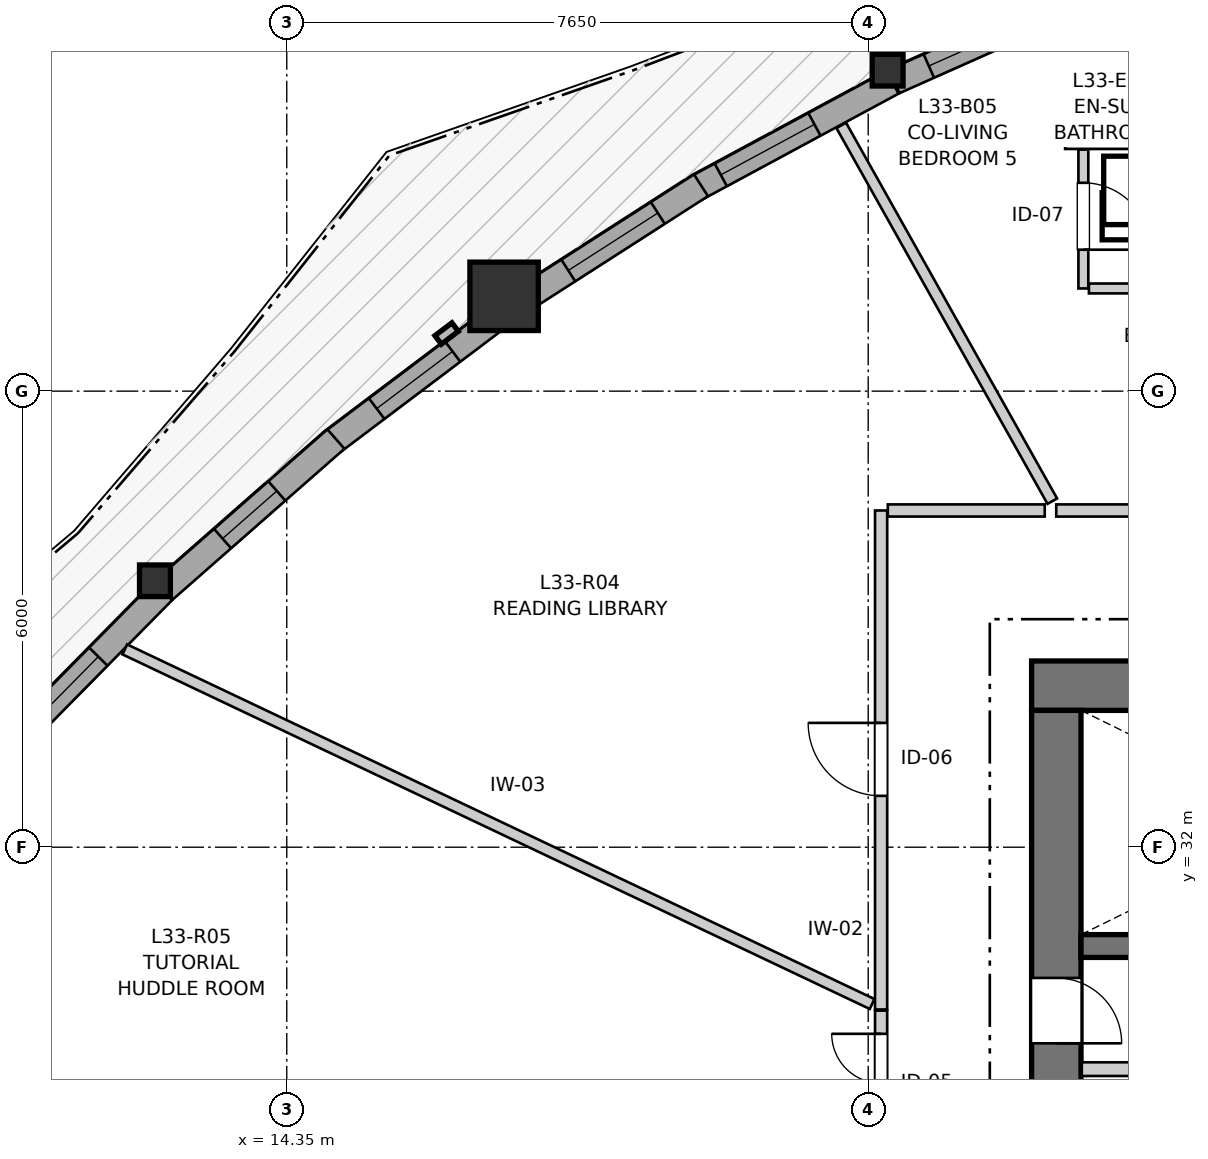
"""IFC4 building model, lengths in metres.
Left out: names, types, materials, properties, quantities, classifications, styles, units other than length and angle.
Written with IfcOpenShell. Run it as: python <this file> out.ifc"""

import sys

from ifc_helpers import new_model, si_unit, direction, frame, frame_2d, origin, origin_2d, place, context, subcontext, project, spatial, rectangle, i_section, extrude, source, transform, mapped, element, fill, save


model = new_model("IFC4")
c1 = context("Model", 3, precision=1e-05, world=origin(), true_north=direction((0.0, 1.0)))
c2 = subcontext(c1, "Body", "Model", "MODEL_VIEW")
j1 = project(units=[si_unit("LENGTHUNIT", "METRE"), si_unit("PLANEANGLEUNIT", "RADIAN")], contexts=[c1])
p1 = place(None, origin())
s1 = spatial("IfcSite", under=j1, at=p1, CompositionType="ELEMENT")
p2 = place(p1, origin())
s2 = spatial("IfcBuilding", under=s1, at=p2, CompositionType="ELEMENT")
p3 = place(p2, frame((0.0, 0.0, 112.0)))
s3 = spatial("IfcBuildingStorey", under=s2, at=p3, CompositionType="ELEMENT", Elevation=112.0)
p4 = place(p3, frame((36.55, 34.125, 0.0), z_axis=(0.0, 0.0, 1.0), x_axis=(-1.0, 0.0, 0.0)))
e1 = element("IfcWall", 1, at=p4, inside=s3, PredefinedType="SHEAR", context=c2, shape_type="SweptSolid", body=[
    extrude(rectangle(XDim=12.4, YDim=0.65, at=frame_2d((6.2, 0.0))), origin(), (0.0, 0.0, 1.0), 2.935),
])
p5 = place(p3, frame((24.475, 33.8, 0.0), z_axis=(0.0, 0.0, 1.0), x_axis=(0.0, -1.0, 0.0)))
e2 = element("IfcWall", 2, at=p5, inside=s3, PredefinedType="SHEAR", context=c2, shape_type="SweptSolid", body=[
    extrude(rectangle(XDim=15.6, YDim=0.65, at=frame_2d((7.8, 0.0))), origin(), (0.0, 0.0, 1.0), 2.935),
])
p6 = place(p5, frame((7.05, 0.0, 0.0)))
e3 = element("IfcOpeningElement", 3, at=p6, cuts=e2, PredefinedType="OPENING", context=c2, shape_type="SweptSolid", body=[
    extrude(rectangle(XDim=1.5, YDim=2.15, at=frame_2d((0.75, 1.075))), frame((0.0, 0.335, 0.0), z_axis=(0.0, -1.0, 0.0), x_axis=(1.0, 0.0, 0.0)), (0.0, 0.0, 1.0), 0.67),
])
p7 = place(p5, frame((3.52, 0.0, 0.0)))
e4 = element("IfcOpeningElement", 4, at=p7, cuts=e2, PredefinedType="OPENING", context=c2, shape_type="SweptSolid", body=[
    extrude(rectangle(XDim=0.86, YDim=2.05, at=frame_2d((0.43, 1.025))), frame((0.0, 0.335, 0.0), z_axis=(0.0, -1.0, 0.0), x_axis=(1.0, 0.0, 0.0)), (0.0, 0.0, 1.0), 0.67),
])
p8 = place(p5, frame((11.22, 0.0, 0.0)))
e5 = element("IfcOpeningElement", 5, at=p8, cuts=e2, PredefinedType="OPENING", context=c2, shape_type="SweptSolid", body=[
    extrude(rectangle(XDim=0.86, YDim=2.05, at=frame_2d((0.43, 1.025))), frame((0.0, 0.335, 0.0), z_axis=(0.0, -1.0, 0.0), x_axis=(1.0, 0.0, 0.0)), (0.0, 0.0, 1.0), 0.67),
])
p9 = place(p3, frame((24.8, 30.7, 0.0), z_axis=(0.0, 0.0, 1.0), x_axis=(1.0, 0.0, 0.0)))
e6 = element("IfcWall", 6, at=p9, inside=s3, PredefinedType="SHEAR", context=c2, shape_type="SweptSolid", body=[
    extrude(rectangle(XDim=11.1, YDim=0.3, at=frame_2d((5.55, 0.0))), origin(), (0.0, 0.0, 1.0), 2.935),
])
p10 = place(p9, frame((6.22, 0.0, 0.0)))
e7 = element("IfcOpeningElement", 7, at=p10, cuts=e6, PredefinedType="OPENING", context=c2, shape_type="SweptSolid", body=[
    extrude(rectangle(XDim=0.98, YDim=2.15, at=frame_2d((0.49, 1.075))), frame((0.0, 0.16, 0.0), z_axis=(0.0, -1.0, 0.0), x_axis=(1.0, 0.0, 0.0)), (0.0, 0.0, 1.0), 0.32),
])
p11 = place(p9, frame((9.15, 0.0, 0.0)))
e8 = element("IfcOpeningElement", 8, at=p11, cuts=e6, PredefinedType="OPENING", context=c2, shape_type="SweptSolid", body=[
    extrude(rectangle(XDim=1.15, YDim=2.15, at=frame_2d((0.575, 1.075))), frame((0.0, 0.16, 0.0), z_axis=(0.0, -1.0, 0.0), x_axis=(1.0, 0.0, 0.0)), (0.0, 0.0, 1.0), 0.32),
])
m1 = source(origin(), c2, "Body", "SweptSolid", [
    extrude(i_section(OverallWidth=0.406, OverallDepth=0.416, WebThickness=0.027, FlangeThickness=0.044, FilletRadius=0.015, at=origin_2d()), origin(), (0.0, 0.0, 1.0), 2.935),
])
p12 = place(p3, frame((22.256, 42.222, 0.0), z_axis=(0.0, 0.0, 1.0), x_axis=(1.0, 0.0, 0.0)))
e9 = element("IfcColumn", 9, at=p12, inside=s3, PredefinedType="PILASTER", context=c2, shape_type="MappedRepresentation", body=[
    mapped(m1, transform((0.0, 0.0, 0.0), x_axis=(1.0, 0.0, 0.0), y_axis=(0.0, 1.0, 0.0), z_axis=(0.0, 0.0, 1.0), scale=1.0)),
])
m2 = source(origin(), c2, "Body", "SweptSolid", [
    extrude(rectangle(XDim=0.9, YDim=0.9, at=origin_2d()), origin(), (0.0, 0.0, 1.0), 2.935),
])
p13 = place(p3, frame((17.209, 39.247, 0.0), z_axis=(0.0, 0.0, 1.0), x_axis=(1.0, 0.0, 0.0)))
e10 = element("IfcColumn", 10, at=p13, inside=s3, PredefinedType="COLUMN", context=c2, shape_type="MappedRepresentation", body=[
    mapped(m2, transform((0.0, 0.0, 0.0), x_axis=(1.0, 0.0, 0.0), y_axis=(0.0, 1.0, 0.0), z_axis=(0.0, 0.0, 1.0), scale=1.0)),
])
p14 = place(p3, frame((12.616, 35.505, 0.0), z_axis=(0.0, 0.0, 1.0), x_axis=(1.0, 0.0, 0.0)))
e11 = element("IfcColumn", 11, at=p14, inside=s3, PredefinedType="PILASTER", context=c2, shape_type="MappedRepresentation", body=[
    mapped(m1, transform((0.0, 0.0, 0.0), x_axis=(1.0, 0.0, 0.0), y_axis=(0.0, 1.0, 0.0), z_axis=(0.0, 0.0, 1.0), scale=1.0)),
])
p15 = place(p3, frame((25.052, 43.283, 0.0), z_axis=(0.0, 0.0, 1.0), x_axis=(-0.913400340023, -0.407062426227, 0.0)))
e12 = element("IfcWall", 12, at=p15, inside=s3, PredefinedType="SOLIDWALL", context=c2, shape_type="SweptSolid", body=[
    extrude(rectangle(XDim=2.966, YDim=0.34, at=frame_2d((1.483, 0.0))), origin(), (0.0, 0.0, 1.0), 2.465),
])
p16 = place(p15, frame((0.518, 0.0, 0.82)))
e13 = element("IfcOpeningElement", 13, at=p16, cuts=e12, PredefinedType="OPENING", context=c2, shape_type="SweptSolid", body=[
    extrude(rectangle(XDim=1.95, YDim=1.4, at=frame_2d((0.975, 0.7))), frame((0.0, 0.18, 0.0), z_axis=(0.0, -1.0, 0.0), x_axis=(1.0, 0.0, 0.0)), (0.0, 0.0, 1.0), 0.36),
])
p17 = place(p3, frame((22.319, 42.063, 0.0), z_axis=(0.0, 0.0, 1.0), x_axis=(-0.880050731383, -0.4748796797, 0.0)))
e14 = element("IfcWall", 14, at=p17, inside=s3, PredefinedType="SOLIDWALL", context=c2, shape_type="SweptSolid", body=[
    extrude(rectangle(XDim=2.949, YDim=0.34, at=frame_2d((1.475, 0.0))), origin(), (0.0, 0.0, 1.0), 2.465),
])
p18 = place(p17, frame((1.166, 0.0, 0.82)))
e15 = element("IfcOpeningElement", 15, at=p18, cuts=e14, PredefinedType="OPENING", context=c2, shape_type="SweptSolid", body=[
    extrude(rectangle(XDim=1.4, YDim=1.35, at=frame_2d((0.7, 0.675))), frame((0.0, 0.18, 0.0), z_axis=(0.0, -1.0, 0.0), x_axis=(1.0, 0.0, 0.0)), (0.0, 0.0, 1.0), 0.36),
])
p19 = place(p3, frame((19.8, 40.708, 0.0), z_axis=(0.0, 0.0, 1.0), x_axis=(-0.841470838401, -0.540302533883, 0.0)))
e16 = element("IfcWall", 16, at=p19, inside=s3, PredefinedType="SOLIDWALL", context=c2, shape_type="SweptSolid", body=[
    extrude(rectangle(XDim=2.739, YDim=0.34, at=frame_2d((1.37, 0.0))), origin(), (0.0, 0.0, 1.0), 2.465),
])
p20 = place(p19, frame((0.675, 0.0, 0.82)))
e17 = element("IfcOpeningElement", 17, at=p20, cuts=e16, PredefinedType="OPENING", context=c2, shape_type="SweptSolid", body=[
    extrude(rectangle(XDim=1.4, YDim=1.35, at=frame_2d((0.7, 0.675))), frame((0.0, 0.18, 0.0), z_axis=(0.0, -1.0, 0.0), x_axis=(1.0, 0.0, 0.0)), (0.0, 0.0, 1.0), 0.36),
])
p21 = place(p3, frame((17.128, 38.973, 0.0), z_axis=(0.0, 0.0, 1.0), x_axis=(-0.798381200707, -0.602152354772, 0.0)))
e18 = element("IfcWall", 18, at=p21, inside=s3, PredefinedType="SOLIDWALL", context=c2, shape_type="SweptSolid", body=[
    extrude(rectangle(XDim=2.756, YDim=0.34, at=frame_2d((1.378, 0.0))), origin(), (0.0, 0.0, 1.0), 2.465),
])
p22 = place(p21, frame((0.748, 0.0, 0.82)))
e19 = element("IfcOpeningElement", 19, at=p22, cuts=e18, PredefinedType="OPENING", context=c2, shape_type="SweptSolid", body=[
    extrude(rectangle(XDim=1.25, YDim=1.35, at=frame_2d((0.625, 0.675))), frame((0.0, 0.18, 0.0), z_axis=(0.0, -1.0, 0.0), x_axis=(1.0, 0.0, 0.0)), (0.0, 0.0, 1.0), 0.36),
])
p23 = place(p3, frame((14.997, 37.37, 0.0), z_axis=(0.0, 0.0, 1.0), x_axis=(-0.751446130796, -0.659794447166, 0.0)))
e20 = element("IfcWall", 20, at=p23, inside=s3, PredefinedType="SOLIDWALL", context=c2, shape_type="SweptSolid", body=[
    extrude(rectangle(XDim=3.0, YDim=0.34, at=frame_2d((1.5, 0.0))), origin(), (0.0, 0.0, 1.0), 2.465),
])
p24 = place(p23, frame((1.035, 0.0, 0.82)))
e21 = element("IfcOpeningElement", 21, at=p24, cuts=e20, PredefinedType="OPENING", context=c2, shape_type="SweptSolid", body=[
    extrude(rectangle(XDim=0.95, YDim=1.35, at=frame_2d((0.475, 0.675))), frame((0.0, 0.18, 0.0), z_axis=(0.0, -1.0, 0.0), x_axis=(1.0, 0.0, 0.0)), (0.0, 0.0, 1.0), 0.36),
])
p25 = place(p3, frame((12.723, 35.372, 0.0), z_axis=(0.0, 0.0, 1.0), x_axis=(-0.701922597509, -0.71225323243, 0.0)))
e22 = element("IfcWall", 22, at=p25, inside=s3, PredefinedType="SOLIDWALL", context=c2, shape_type="SweptSolid", body=[
    extrude(rectangle(XDim=3.049, YDim=0.34, at=frame_2d((1.524, 0.0))), origin(), (0.0, 0.0, 1.0), 2.465),
])
p26 = place(p25, frame((1.214, 0.0, 0.82)))
e23 = element("IfcOpeningElement", 23, at=p26, cuts=e22, PredefinedType="OPENING", context=c2, shape_type="SweptSolid", body=[
    extrude(rectangle(XDim=1.45, YDim=1.25, at=frame_2d((0.725, 0.625))), frame((0.0, 0.18, 0.0), z_axis=(0.0, -1.0, 0.0), x_axis=(1.0, 0.0, 0.0)), (0.0, 0.0, 1.0), 0.36),
])
p27 = place(p3, frame((24.81, 29.08, 0.0), z_axis=(0.0, 0.0, 1.0), x_axis=(1.0, 0.0, 0.0)))
e24 = element("IfcWall", 24, at=p27, inside=s3, PredefinedType="PARTITIONING", context=c2, shape_type="SweptSolid", body=[
    extrude(rectangle(XDim=5.84, YDim=0.18, at=frame_2d((2.92, 0.0))), origin(), (0.0, 0.0, 1.0), 2.935),
])
p28 = place(p3, frame((22.17, 29.865, 0.0), z_axis=(0.0, 0.0, 1.0), x_axis=(0.0, 1.0, 0.0)))
e25 = element("IfcWall", 25, at=p28, inside=s3, PredefinedType="PARTITIONING", context=c2, shape_type="SweptSolid", body=[
    extrude(rectangle(XDim=6.565, YDim=0.16, at=frame_2d((3.282, 0.0))), origin(), (0.0, 0.0, 1.0), 2.935),
])
p29 = place(p28, frame((2.811, 0.0, 0.0)))
e26 = element("IfcOpeningElement", 26, at=p29, cuts=e25, PredefinedType="OPENING", context=c2, shape_type="SweptSolid", body=[
    extrude(rectangle(XDim=0.96, YDim=2.1, at=frame_2d((0.48, 1.05))), frame((0.0, 0.09, 0.0), z_axis=(0.0, -1.0, 0.0), x_axis=(1.0, 0.0, 0.0)), (0.0, 0.0, 1.0), 0.18),
])
p30 = place(p3, frame((24.474, 36.43, 0.0), z_axis=(0.0, 0.0, 1.0), x_axis=(1.0, 0.0, 0.0)))
e27 = element("IfcWall", 27, at=p30, inside=s3, PredefinedType="PARTITIONING", context=c2, shape_type="SweptSolid", body=[
    extrude(rectangle(XDim=2.914, YDim=0.16, at=frame_2d((1.457, 0.0))), origin(), (0.0, 0.0, 1.0), 2.573),
])
p31 = place(p30, frame((0.998, 0.0, 0.0)))
e28 = element("IfcOpeningElement", 28, at=p31, cuts=e27, PredefinedType="OPENING", context=c2, shape_type="SweptSolid", body=[
    extrude(rectangle(XDim=0.92, YDim=2.1, at=frame_2d((0.46, 1.05))), frame((0.0, 0.09, 0.0), z_axis=(0.0, -1.0, 0.0), x_axis=(1.0, 0.0, 0.0)), (0.0, 0.0, 1.0), 0.18),
])
p32 = place(p3, frame((22.17, 27.85, 0.0), z_axis=(0.0, 0.0, 1.0), x_axis=(0.0, 1.0, 0.0)))
e29 = element("IfcWall", 29, at=p32, inside=s3, PredefinedType="PARTITIONING", context=c2, shape_type="SweptSolid", body=[
    extrude(rectangle(XDim=2.0, YDim=0.16, at=frame_2d((1.0, 0.0))), origin(), (0.0, 0.0, 1.0), 2.935),
])
p33 = place(p32, frame((0.395, 0.0, 0.0)))
e30 = element("IfcOpeningElement", 30, at=p33, cuts=e29, PredefinedType="OPENING", context=c2, shape_type="SweptSolid", body=[
    extrude(rectangle(XDim=1.3, YDim=2.1, at=frame_2d((0.65, 1.05))), frame((0.0, 0.09, 0.0), z_axis=(0.0, -1.0, 0.0), x_axis=(1.0, 0.0, 0.0)), (0.0, 0.0, 1.0), 0.18),
])
p34 = place(p3, frame((24.831, 41.178, 0.0), z_axis=(0.0, 0.0, 1.0), x_axis=(0.0, -1.0, 0.0)))
e31 = element("IfcWall", 31, at=p34, inside=s3, PredefinedType="PARTITIONING", context=c2, shape_type="SweptSolid", body=[
    extrude(rectangle(XDim=1.827, YDim=0.13, at=frame_2d((0.914, 0.0))), origin(), (0.0, 0.0, 1.0), 2.935),
])
p35 = place(p34, frame((0.437, 0.0, 0.0)))
e32 = element("IfcOpeningElement", 32, at=p35, cuts=e31, PredefinedType="OPENING", context=c2, shape_type="SweptSolid", body=[
    extrude(rectangle(XDim=0.88, YDim=2.05, at=frame_2d((0.44, 1.025))), frame((0.0, 0.075, 0.0), z_axis=(0.0, -1.0, 0.0), x_axis=(1.0, 0.0, 0.0)), (0.0, 0.0, 1.0), 0.15),
])
p36 = place(p3, frame((12.219, 34.602, 0.0), z_axis=(0.0, 0.0, 1.0), x_axis=(0.90346129999, -0.428669662351, 0.0)))
e33 = element("IfcWall", 33, at=p36, inside=s3, PredefinedType="PARTITIONING", context=c2, shape_type="SweptSolid", body=[
    extrude(rectangle(XDim=10.883, YDim=0.145, at=frame_2d((5.441, 0.0))), origin(), (0.0, 0.0, 1.0), 2.935),
])
p37 = place(p3, frame((21.645, 41.497, 0.0), z_axis=(0.0, 0.0, 1.0), x_axis=(0.489699005063, -0.871891555436, 0.0)))
e34 = element("IfcWall", 34, at=p37, inside=s3, PredefinedType="PARTITIONING", context=c2, shape_type="SweptSolid", body=[
    extrude(rectangle(XDim=5.671, YDim=0.145, at=frame_2d((2.835, 0.0))), origin(), (0.0, 0.0, 1.0), 2.935),
])
p38 = place(p3, frame((22.258, 36.43, 0.0), z_axis=(0.0, 0.0, 1.0), x_axis=(1.0, 0.0, 0.0)))
e35 = element("IfcWall", 35, at=p38, inside=s3, PredefinedType="PARTITIONING", context=c2, shape_type="SweptSolid", body=[
    extrude(rectangle(XDim=2.065, YDim=0.16, at=frame_2d((1.032, 0.0))), origin(), (0.0, 0.0, 1.0), 2.935),
])
p39 = place(p3, frame((24.904, 39.351, 0.0), z_axis=(0.0, 0.0, 1.0), x_axis=(1.0, 0.0, 0.0)))
e36 = element("IfcWall", 36, at=p39, inside=s3, PredefinedType="PARTITIONING", context=c2, shape_type="SweptSolid", body=[
    extrude(rectangle(XDim=1.533, YDim=0.13, at=frame_2d((0.767, 0.0))), origin(), (0.0, 0.0, 1.0), 2.935),
])
p40 = place(p3, frame((25.433, 43.222, 0.0), z_axis=(0.0, 0.0, 1.0), x_axis=(0.274641170969, -0.961546788882, 0.0)))
e37 = element("IfcWall", 37, at=p40, inside=s3, PredefinedType="PARTITIONING", context=c2, shape_type="SweptSolid", body=[
    extrude(rectangle(XDim=1.21, YDim=0.145, at=frame_2d((0.605, 0.0))), origin(), (0.0, 0.0, 1.0), 2.935),
])
p41 = place(p3, frame((24.591, 41.251, 0.0), z_axis=(0.0, 0.0, 1.0), x_axis=(1.0, 0.0, 0.0)))
e38 = element("IfcWall", 38, at=p41, inside=s3, PredefinedType="PARTITIONING", context=c2, shape_type="SweptSolid", body=[
    extrude(rectangle(XDim=1.215, YDim=0.13, at=frame_2d((0.607, 0.0))), origin(), (0.0, 0.0, 1.0), 2.935),
])
m3 = source(origin(), c2, "Body", "SweptSolid", [
    extrude(rectangle(XDim=1.95, YDim=1.4, at=frame_2d((0.975, 0.7))), frame((0.0, 0.03, 0.0), z_axis=(0.0, -1.0, 0.0), x_axis=(1.0, 0.0, 0.0)), (0.0, 0.0, 1.0), 0.06),
])
p42 = place(p16, origin())
e39 = element("IfcWindow", 39, at=p42, inside=s3, PartitioningType="SINGLE_PANEL", PredefinedType="WINDOW", context=c2, shape_type="MappedRepresentation", body=[
    mapped(m3, transform((0.0, 0.0, 0.0), x_axis=(1.0, 0.0, 0.0), y_axis=(0.0, 1.0, 0.0), z_axis=(0.0, 0.0, 1.0), scale=1.0)),
])
fill(e13, e39)
m4 = source(origin(), c2, "Body", "SweptSolid", [
    extrude(rectangle(XDim=1.4, YDim=1.35, at=frame_2d((0.7, 0.675))), frame((0.0, 0.03, 0.0), z_axis=(0.0, -1.0, 0.0), x_axis=(1.0, 0.0, 0.0)), (0.0, 0.0, 1.0), 0.06),
])
p43 = place(p18, origin())
e40 = element("IfcWindow", 40, at=p43, inside=s3, PartitioningType="SINGLE_PANEL", PredefinedType="WINDOW", context=c2, shape_type="MappedRepresentation", body=[
    mapped(m4, transform((0.0, 0.0, 0.0), x_axis=(1.0, 0.0, 0.0), y_axis=(0.0, 1.0, 0.0), z_axis=(0.0, 0.0, 1.0), scale=1.0)),
])
fill(e15, e40)
p44 = place(p20, origin())
e41 = element("IfcWindow", 41, at=p44, inside=s3, PartitioningType="SINGLE_PANEL", PredefinedType="WINDOW", context=c2, shape_type="MappedRepresentation", body=[
    mapped(m4, transform((0.0, 0.0, 0.0), x_axis=(1.0, 0.0, 0.0), y_axis=(0.0, 1.0, 0.0), z_axis=(0.0, 0.0, 1.0), scale=1.0)),
])
fill(e17, e41)
m5 = source(origin(), c2, "Body", "SweptSolid", [
    extrude(rectangle(XDim=1.25, YDim=1.35, at=frame_2d((0.625, 0.675))), frame((0.0, 0.03, 0.0), z_axis=(0.0, -1.0, 0.0), x_axis=(1.0, 0.0, 0.0)), (0.0, 0.0, 1.0), 0.06),
])
p45 = place(p22, origin())
e42 = element("IfcWindow", 42, at=p45, inside=s3, PartitioningType="SINGLE_PANEL", PredefinedType="WINDOW", context=c2, shape_type="MappedRepresentation", body=[
    mapped(m5, transform((0.0, 0.0, 0.0), x_axis=(1.0, 0.0, 0.0), y_axis=(0.0, 1.0, 0.0), z_axis=(0.0, 0.0, 1.0), scale=1.0)),
])
fill(e19, e42)
m6 = source(origin(), c2, "Body", "SweptSolid", [
    extrude(rectangle(XDim=0.95, YDim=1.35, at=frame_2d((0.475, 0.675))), frame((0.0, 0.03, 0.0), z_axis=(0.0, -1.0, 0.0), x_axis=(1.0, 0.0, 0.0)), (0.0, 0.0, 1.0), 0.06),
])
p46 = place(p24, origin())
e43 = element("IfcWindow", 43, at=p46, inside=s3, PartitioningType="SINGLE_PANEL", PredefinedType="WINDOW", context=c2, shape_type="MappedRepresentation", body=[
    mapped(m6, transform((0.0, 0.0, 0.0), x_axis=(1.0, 0.0, 0.0), y_axis=(0.0, 1.0, 0.0), z_axis=(0.0, 0.0, 1.0), scale=1.0)),
])
fill(e21, e43)
m7 = source(origin(), c2, "Body", "SweptSolid", [
    extrude(rectangle(XDim=1.45, YDim=1.25, at=frame_2d((0.725, 0.625))), frame((0.0, 0.03, 0.0), z_axis=(0.0, -1.0, 0.0), x_axis=(1.0, 0.0, 0.0)), (0.0, 0.0, 1.0), 0.06),
])
p47 = place(p26, origin())
e44 = element("IfcWindow", 44, at=p47, inside=s3, PartitioningType="SINGLE_PANEL", PredefinedType="WINDOW", context=c2, shape_type="MappedRepresentation", body=[
    mapped(m7, transform((0.0, 0.0, 0.0), x_axis=(1.0, 0.0, 0.0), y_axis=(0.0, 1.0, 0.0), z_axis=(0.0, 0.0, 1.0), scale=1.0)),
])
fill(e23, e44)
m8 = source(origin(), c2, "Body", "SweptSolid", [
    extrude(rectangle(XDim=0.86, YDim=2.05, at=frame_2d((0.43, 1.025))), frame((0.0, 0.025, 0.0), z_axis=(0.0, -1.0, 0.0), x_axis=(1.0, 0.0, 0.0)), (0.0, 0.0, 1.0), 0.05),
])
p48 = place(p7, origin())
e45 = element("IfcDoor", 45, at=p48, inside=s3, OperationType="SINGLE_SWING_RIGHT", PredefinedType="DOOR", context=c2, shape_type="MappedRepresentation", body=[
    mapped(m8, transform((0.0, 0.0, 0.0), x_axis=(1.0, 0.0, 0.0), y_axis=(0.0, 1.0, 0.0), z_axis=(0.0, 0.0, 1.0), scale=1.0)),
])
fill(e4, e45)
m9 = source(origin(), c2, "Body", "SweptSolid", [
    extrude(rectangle(XDim=0.96, YDim=2.1, at=frame_2d((0.48, 1.05))), frame((0.0, 0.025, 0.0), z_axis=(0.0, -1.0, 0.0), x_axis=(1.0, 0.0, 0.0)), (0.0, 0.0, 1.0), 0.05),
])
p49 = place(p29, origin())
e46 = element("IfcDoor", 46, at=p49, inside=s3, OperationType="SINGLE_SWING_RIGHT", PredefinedType="DOOR", context=c2, shape_type="MappedRepresentation", body=[
    mapped(m9, transform((0.0, 0.0, 0.0), x_axis=(1.0, 0.0, 0.0), y_axis=(0.0, 1.0, 0.0), z_axis=(0.0, 0.0, 1.0), scale=1.0)),
])
fill(e26, e46)
m10 = source(origin(), c2, "Body", "SweptSolid", [
    extrude(rectangle(XDim=1.3, YDim=2.1, at=frame_2d((0.65, 1.05))), frame((0.0, 0.025, 0.0), z_axis=(0.0, -1.0, 0.0), x_axis=(1.0, 0.0, 0.0)), (0.0, 0.0, 1.0), 0.05),
])
p50 = place(p33, origin())
e47 = element("IfcDoor", 47, at=p50, inside=s3, OperationType="DOUBLE_DOOR_SINGLE_SWING", PredefinedType="DOOR", context=c2, shape_type="MappedRepresentation", body=[
    mapped(m10, transform((0.0, 0.0, 0.0), x_axis=(1.0, 0.0, 0.0), y_axis=(0.0, 1.0, 0.0), z_axis=(0.0, 0.0, 1.0), scale=1.0)),
])
fill(e30, e47)
m11 = source(origin(), c2, "Body", "SweptSolid", [
    extrude(rectangle(XDim=0.88, YDim=2.05, at=frame_2d((0.44, 1.025))), frame((0.0, 0.025, 0.0), z_axis=(0.0, -1.0, 0.0), x_axis=(1.0, 0.0, 0.0)), (0.0, 0.0, 1.0), 0.05),
])
p51 = place(p35, origin())
e48 = element("IfcDoor", 48, at=p51, inside=s3, OperationType="SINGLE_SWING_RIGHT", PredefinedType="DOOR", context=c2, shape_type="MappedRepresentation", body=[
    mapped(m11, transform((0.0, 0.0, 0.0), x_axis=(1.0, 0.0, 0.0), y_axis=(0.0, 1.0, 0.0), z_axis=(0.0, 0.0, 1.0), scale=1.0)),
])
fill(e32, e48)
save(model, sys.argv[1])
